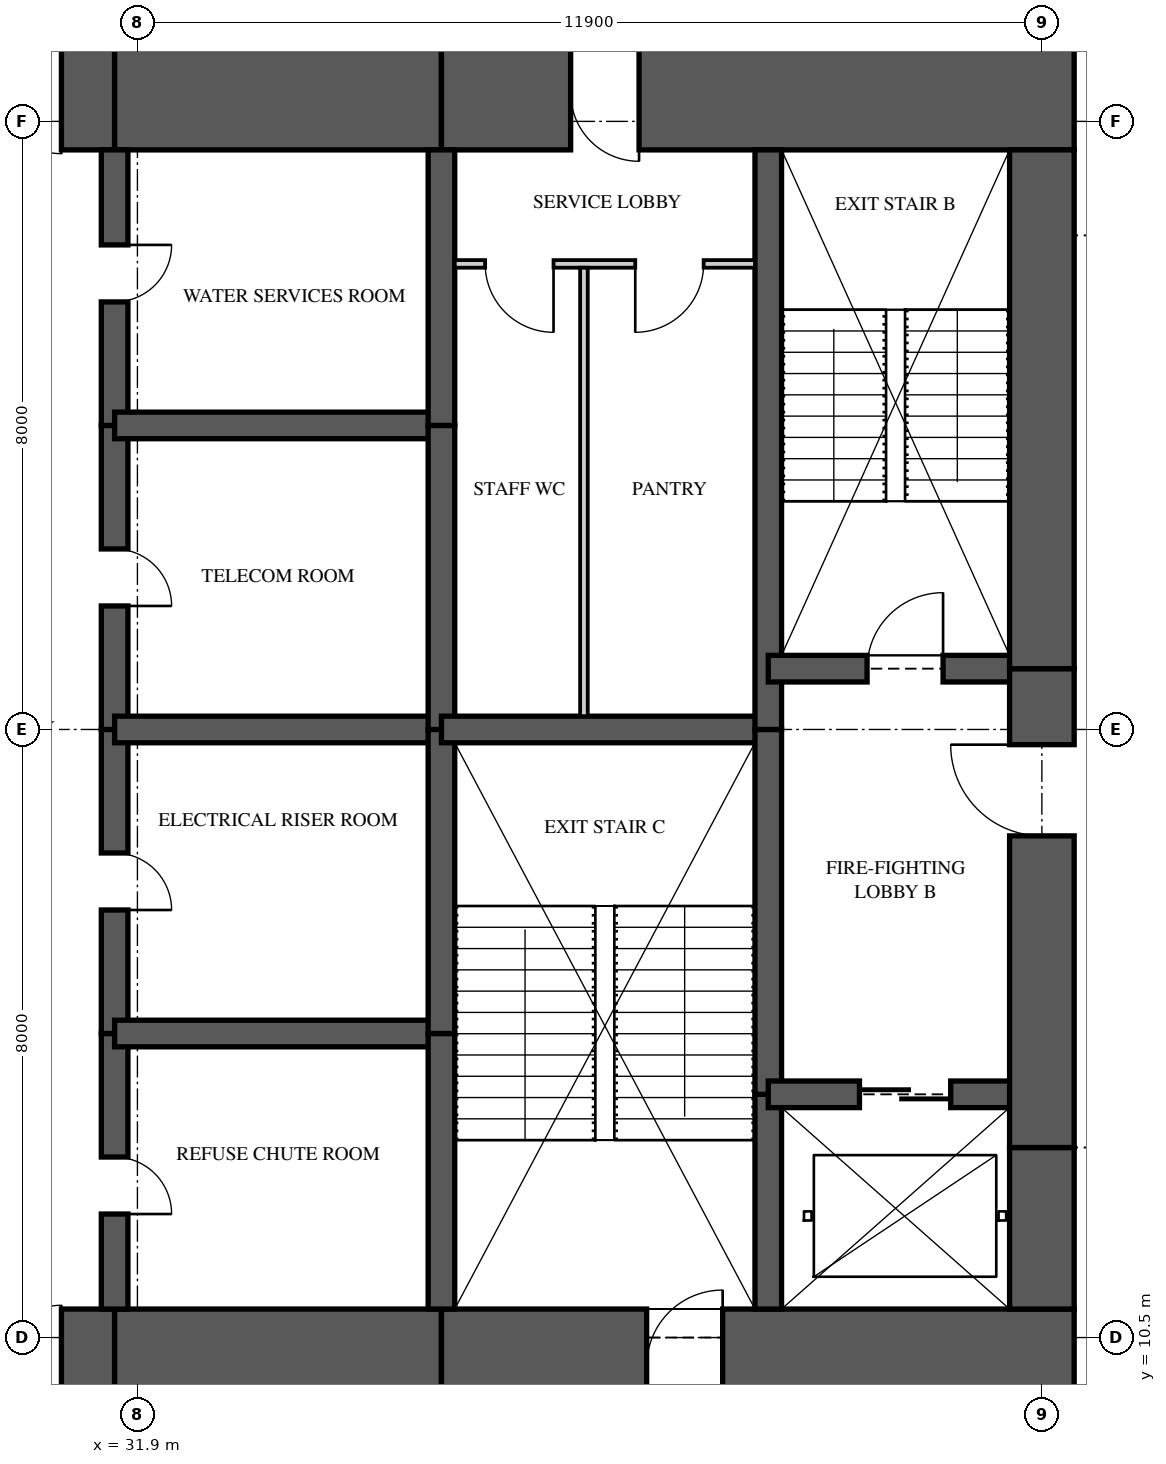
"""IFC4 building model, lengths in metres.
Left out: names, types, materials, properties, quantities, classifications, styles, units other than length and angle.
Written with IfcOpenShell. Run it as: python <this file> out.ifc"""

import sys

from ifc_helpers import new_model, si_unit, direction, frame, frame_2d, origin, place, context, subcontext, project, spatial, rectangle, extrude, element, fill, save


model = new_model("IFC4")
c1 = context("Model", 3, precision=1e-05, world=origin(), true_north=direction((0.0, 1.0)))
c2 = subcontext(c1, "Body", "Model", "MODEL_VIEW")
j1 = project(units=[si_unit("LENGTHUNIT", "METRE"), si_unit("PLANEANGLEUNIT", "RADIAN")], contexts=[c1])
p1 = place(None, origin())
s1 = spatial("IfcSite", under=j1, at=p1, CompositionType="ELEMENT")
p2 = place(p1, origin())
s2 = spatial("IfcBuilding", under=s1, at=p2, CompositionType="ELEMENT")
p3 = place(p2, frame((0.0, 0.0, 108.2)))
s3 = spatial("IfcBuildingStorey", under=s2, at=p3, CompositionType="ELEMENT", Elevation=108.2)
p4 = place(p3, frame((26.0, 10.125, 0.0), z_axis=(0.0, 0.0, 1.0), x_axis=(1.0, 0.0, 0.0)))
e1 = element("IfcWall", 1, at=p4, inside=s3, PredefinedType="SHEAR", context=c2, shape_type="SweptSolid", body=[
    extrude(rectangle(XDim=5.6, YDim=1.5, at=frame_2d((2.8, 0.0))), origin(), (0.0, 0.0, 1.0), 3.35),
])
p5 = place(p4, frame((3.3, 0.0, 0.0)))
e2 = element("IfcOpeningElement", 2, at=p5, cuts=e1, PredefinedType="OPENING", context=c2, shape_type="SweptSolid", body=[
    extrude(rectangle(XDim=1.6, YDim=2.1, at=frame_2d((0.8, 1.05))), frame((0.0, 0.76, 0.0), z_axis=(0.0, -1.0, 0.0), x_axis=(1.0, 0.0, 0.0)), (0.0, 0.0, 1.0), 1.52),
])
p6 = place(p3, frame((31.6, 10.125, 0.0), z_axis=(0.0, 0.0, 1.0), x_axis=(1.0, 0.0, 0.0)))
e3 = element("IfcWall", 3, at=p6, inside=s3, PredefinedType="SHEAR", context=c2, shape_type="SweptSolid", body=[
    extrude(rectangle(XDim=4.3, YDim=1.5, at=frame_2d((2.15, 0.0))), origin(), (0.0, 0.0, 1.0), 3.35),
])
p7 = place(p3, frame((35.9, 10.125, 0.0), z_axis=(0.0, 0.0, 1.0), x_axis=(1.0, 0.0, 0.0)))
e4 = element("IfcWall", 4, at=p7, inside=s3, PredefinedType="SHEAR", context=c2, shape_type="SweptSolid", body=[
    extrude(rectangle(XDim=8.325, YDim=1.5, at=frame_2d((4.163, 0.0))), origin(), (0.0, 0.0, 1.0), 3.35),
])
p8 = place(p7, frame((2.7, 0.0, 0.0)))
e5 = element("IfcOpeningElement", 5, at=p8, cuts=e4, PredefinedType="OPENING", context=c2, shape_type="SweptSolid", body=[
    extrude(rectangle(XDim=1.0, YDim=2.1, at=frame_2d((0.5, 1.05))), frame((0.0, 0.76, 0.0), z_axis=(0.0, -1.0, 0.0), x_axis=(1.0, 0.0, 0.0)), (0.0, 0.0, 1.0), 1.52),
])
p9 = place(p3, frame((44.225, 26.875, 0.0), z_axis=(0.0, 0.0, 1.0), x_axis=(-1.0, 0.0, 0.0)))
e6 = element("IfcWall", 6, at=p9, inside=s3, PredefinedType="SHEAR", context=c2, shape_type="SweptSolid", body=[
    extrude(rectangle(XDim=8.325, YDim=1.5, at=frame_2d((4.163, 0.0))), origin(), (0.0, 0.0, 1.0), 3.35),
])
p10 = place(p9, frame((5.725, 0.0, 0.0)))
e7 = element("IfcOpeningElement", 7, at=p10, cuts=e6, PredefinedType="OPENING", context=c2, shape_type="SweptSolid", body=[
    extrude(rectangle(XDim=0.9, YDim=2.1, at=frame_2d((0.45, 1.05))), frame((0.0, 0.76, 0.0), z_axis=(0.0, -1.0, 0.0), x_axis=(1.0, 0.0, 0.0)), (0.0, 0.0, 1.0), 1.52),
])
p11 = place(p3, frame((35.9, 26.875, 0.0), z_axis=(0.0, 0.0, 1.0), x_axis=(-1.0, 0.0, 0.0)))
e8 = element("IfcWall", 8, at=p11, inside=s3, PredefinedType="SHEAR", context=c2, shape_type="SweptSolid", body=[
    extrude(rectangle(XDim=4.3, YDim=1.5, at=frame_2d((2.15, 0.0))), origin(), (0.0, 0.0, 1.0), 3.35),
])
p12 = place(p3, frame((31.6, 26.875, 0.0), z_axis=(0.0, 0.0, 1.0), x_axis=(-1.0, 0.0, 0.0)))
e9 = element("IfcWall", 9, at=p12, inside=s3, PredefinedType="SHEAR", context=c2, shape_type="SweptSolid", body=[
    extrude(rectangle(XDim=5.6, YDim=1.5, at=frame_2d((2.8, 0.0))), origin(), (0.0, 0.0, 1.0), 3.35),
])
p13 = place(p12, frame((0.7, 0.0, 0.0)))
e10 = element("IfcOpeningElement", 10, at=p13, cuts=e9, PredefinedType="OPENING", context=c2, shape_type="SweptSolid", body=[
    extrude(rectangle(XDim=1.6, YDim=2.1, at=frame_2d((0.8, 1.05))), frame((0.0, 0.76, 0.0), z_axis=(0.0, -1.0, 0.0), x_axis=(1.0, 0.0, 0.0)), (0.0, 0.0, 1.0), 1.52),
])
p14 = place(p3, frame((43.8, 10.875, 0.0), z_axis=(0.0, 0.0, 1.0), x_axis=(0.0, 1.0, 0.0)))
e11 = element("IfcWall", 11, at=p14, inside=s3, PredefinedType="SHEAR", context=c2, shape_type="SweptSolid", body=[
    extrude(rectangle(XDim=2.125, YDim=0.85, at=frame_2d((1.062, 0.0))), origin(), (0.0, 0.0, 1.0), 3.35),
])
p15 = place(p3, frame((43.8, 13.0, 0.0), z_axis=(0.0, 0.0, 1.0), x_axis=(0.0, 1.0, 0.0)))
e12 = element("IfcWall", 12, at=p15, inside=s3, PredefinedType="SHEAR", context=c2, shape_type="SweptSolid", body=[
    extrude(rectangle(XDim=6.3, YDim=0.85, at=frame_2d((3.15, 0.0))), origin(), (0.0, 0.0, 1.0), 3.35),
])
p16 = place(p15, frame((4.1, 0.0, 0.0)))
e13 = element("IfcOpeningElement", 13, at=p16, cuts=e12, PredefinedType="OPENING", context=c2, shape_type="SweptSolid", body=[
    extrude(rectangle(XDim=1.2, YDim=2.2, at=frame_2d((0.6, 1.1))), frame((0.0, 0.435, 0.0), z_axis=(0.0, -1.0, 0.0), x_axis=(1.0, 0.0, 0.0)), (0.0, 0.0, 1.0), 0.87),
])
p17 = place(p3, frame((43.8, 19.3, 0.0), z_axis=(0.0, 0.0, 1.0), x_axis=(0.0, 1.0, 0.0)))
e14 = element("IfcWall", 14, at=p17, inside=s3, PredefinedType="SHEAR", context=c2, shape_type="SweptSolid", body=[
    extrude(rectangle(XDim=6.825, YDim=0.85, at=frame_2d((3.413, 0.0))), origin(), (0.0, 0.0, 1.0), 3.35),
])
p18 = place(p3, frame((31.6, 10.875, 0.0), z_axis=(0.0, 0.0, 1.0), x_axis=(0.0, 1.0, 0.0)))
e15 = element("IfcWall", 15, at=p18, inside=s3, PredefinedType="SHEAR", context=c2, shape_type="SweptSolid", body=[
    extrude(rectangle(XDim=3.625, YDim=0.35, at=frame_2d((1.812, 0.0))), origin(), (0.0, 0.0, 1.0), 3.35),
])
p19 = place(p18, frame((1.25, 0.0, 0.0)))
e16 = element("IfcOpeningElement", 16, at=p19, cuts=e15, PredefinedType="OPENING", context=c2, shape_type="SweptSolid", body=[
    extrude(rectangle(XDim=0.75, YDim=2.1, at=frame_2d((0.375, 1.05))), frame((0.0, 0.185, 0.0), z_axis=(0.0, -1.0, 0.0), x_axis=(1.0, 0.0, 0.0)), (0.0, 0.0, 1.0), 0.37),
])
p20 = place(p3, frame((31.6, 14.5, 0.0), z_axis=(0.0, 0.0, 1.0), x_axis=(0.0, 1.0, 0.0)))
e17 = element("IfcWall", 17, at=p20, inside=s3, PredefinedType="SHEAR", context=c2, shape_type="SweptSolid", body=[
    extrude(rectangle(XDim=4.0, YDim=0.35, at=frame_2d((2.0, 0.0))), origin(), (0.0, 0.0, 1.0), 3.35),
])
p21 = place(p20, frame((1.625, 0.0, 0.0)))
e18 = element("IfcOpeningElement", 18, at=p21, cuts=e17, PredefinedType="OPENING", context=c2, shape_type="SweptSolid", body=[
    extrude(rectangle(XDim=0.75, YDim=2.1, at=frame_2d((0.375, 1.05))), frame((0.0, 0.185, 0.0), z_axis=(0.0, -1.0, 0.0), x_axis=(1.0, 0.0, 0.0)), (0.0, 0.0, 1.0), 0.37),
])
p22 = place(p3, frame((31.6, 18.5, 0.0), z_axis=(0.0, 0.0, 1.0), x_axis=(0.0, 1.0, 0.0)))
e19 = element("IfcWall", 19, at=p22, inside=s3, PredefinedType="SHEAR", context=c2, shape_type="SweptSolid", body=[
    extrude(rectangle(XDim=4.0, YDim=0.35, at=frame_2d((2.0, 0.0))), origin(), (0.0, 0.0, 1.0), 3.35),
])
p23 = place(p22, frame((1.625, 0.0, 0.0)))
e20 = element("IfcOpeningElement", 20, at=p23, cuts=e19, PredefinedType="OPENING", context=c2, shape_type="SweptSolid", body=[
    extrude(rectangle(XDim=0.75, YDim=2.1, at=frame_2d((0.375, 1.05))), frame((0.0, 0.185, 0.0), z_axis=(0.0, -1.0, 0.0), x_axis=(1.0, 0.0, 0.0)), (0.0, 0.0, 1.0), 0.37),
])
p24 = place(p3, frame((31.6, 22.5, 0.0), z_axis=(0.0, 0.0, 1.0), x_axis=(0.0, 1.0, 0.0)))
e21 = element("IfcWall", 21, at=p24, inside=s3, PredefinedType="SHEAR", context=c2, shape_type="SweptSolid", body=[
    extrude(rectangle(XDim=3.625, YDim=0.35, at=frame_2d((1.812, 0.0))), origin(), (0.0, 0.0, 1.0), 3.35),
])
p25 = place(p24, frame((1.625, 0.0, 0.0)))
e22 = element("IfcOpeningElement", 22, at=p25, cuts=e21, PredefinedType="OPENING", context=c2, shape_type="SweptSolid", body=[
    extrude(rectangle(XDim=0.75, YDim=2.1, at=frame_2d((0.375, 1.05))), frame((0.0, 0.185, 0.0), z_axis=(0.0, -1.0, 0.0), x_axis=(1.0, 0.0, 0.0)), (0.0, 0.0, 1.0), 0.37),
])
p26 = place(p3, frame((35.9, 10.875, 0.0), z_axis=(0.0, 0.0, 1.0), x_axis=(0.0, 1.0, 0.0)))
e23 = element("IfcWall", 23, at=p26, inside=s3, PredefinedType="SHEAR", context=c2, shape_type="SweptSolid", body=[
    extrude(rectangle(XDim=3.625, YDim=0.35, at=frame_2d((1.812, 0.0))), origin(), (0.0, 0.0, 1.0), 3.35),
])
for number, where, z_axis, x_axis in (
    (24, (35.9, 14.5, 0.0), (0.0, 0.0, 1.0), (0.0, 1.0, 0.0)),
    (25, (35.9, 18.5, 0.0), (0.0, 0.0, 1.0), (0.0, 1.0, 0.0)),
):
    element("IfcWall", number, at=place(p3, frame(where, z_axis=z_axis, x_axis=x_axis)), inside=s3, PredefinedType="SHEAR", context=c2, shape_type="SweptSolid", body=[
        extrude(rectangle(XDim=4.0, YDim=0.35, at=frame_2d((2.0, 0.0))), origin(), (0.0, 0.0, 1.0), 3.35),
    ])
p27 = place(p3, frame((35.9, 22.5, 0.0), z_axis=(0.0, 0.0, 1.0), x_axis=(0.0, 1.0, 0.0)))
e26 = element("IfcWall", 26, at=p27, inside=s3, PredefinedType="SHEAR", context=c2, shape_type="SweptSolid", body=[
    extrude(rectangle(XDim=3.625, YDim=0.35, at=frame_2d((1.812, 0.0))), origin(), (0.0, 0.0, 1.0), 3.35),
])
p28 = place(p3, frame((40.2, 10.875, 0.0), z_axis=(0.0, 0.0, 1.0), x_axis=(0.0, 1.0, 0.0)))
e27 = element("IfcWall", 27, at=p28, inside=s3, PredefinedType="SHEAR", context=c2, shape_type="SweptSolid", body=[
    extrude(rectangle(XDim=2.825, YDim=0.35, at=frame_2d((1.413, 0.0))), origin(), (0.0, 0.0, 1.0), 3.35),
])
p29 = place(p3, frame((40.2, 13.7, 0.0), z_axis=(0.0, 0.0, 1.0), x_axis=(0.0, 1.0, 0.0)))
e28 = element("IfcWall", 28, at=p29, inside=s3, PredefinedType="SHEAR", context=c2, shape_type="SweptSolid", body=[
    extrude(rectangle(XDim=4.8, YDim=0.35, at=frame_2d((2.4, 0.0))), origin(), (0.0, 0.0, 1.0), 3.35),
])
p30 = place(p3, frame((40.2, 18.5, 0.0), z_axis=(0.0, 0.0, 1.0), x_axis=(0.0, 1.0, 0.0)))
e29 = element("IfcWall", 29, at=p30, inside=s3, PredefinedType="SHEAR", context=c2, shape_type="SweptSolid", body=[
    extrude(rectangle(XDim=7.625, YDim=0.35, at=frame_2d((3.812, 0.0))), origin(), (0.0, 0.0, 1.0), 3.35),
])
for number, where, z_axis, x_axis in (
    (30, (31.6, 14.5, 0.0), (0.0, 0.0, 1.0), (1.0, 0.0, 0.0)),
    (31, (31.6, 18.5, 0.0), (0.0, 0.0, 1.0), (1.0, 0.0, 0.0)),
    (32, (31.6, 22.5, 0.0), (0.0, 0.0, 1.0), (1.0, 0.0, 0.0)),
):
    element("IfcWall", number, at=place(p3, frame(where, z_axis=z_axis, x_axis=x_axis)), inside=s3, PredefinedType="SHEAR", context=c2, shape_type="SweptSolid", body=[
        extrude(rectangle(XDim=4.3, YDim=0.35, at=frame_2d((2.15, 0.0))), origin(), (0.0, 0.0, 1.0), 3.35),
    ])
p31 = place(p3, frame((35.9, 18.5, 0.0), z_axis=(0.0, 0.0, 1.0), x_axis=(1.0, 0.0, 0.0)))
e33 = element("IfcWall", 33, at=p31, inside=s3, PredefinedType="SHEAR", context=c2, shape_type="SweptSolid", body=[
    extrude(rectangle(XDim=4.3, YDim=0.35, at=frame_2d((2.15, 0.0))), origin(), (0.0, 0.0, 1.0), 3.35),
])
p32 = place(p3, frame((40.2, 13.7, 0.0), z_axis=(0.0, 0.0, 1.0), x_axis=(1.0, 0.0, 0.0)))
e34 = element("IfcWall", 34, at=p32, inside=s3, PredefinedType="SHEAR", context=c2, shape_type="SweptSolid", body=[
    extrude(rectangle(XDim=3.6, YDim=0.35, at=frame_2d((1.8, 0.0))), origin(), (0.0, 0.0, 1.0), 3.35),
])
p33 = place(p32, frame((1.2, 0.0, 0.0)))
e35 = element("IfcOpeningElement", 35, at=p33, cuts=e34, PredefinedType="OPENING", context=c2, shape_type="SweptSolid", body=[
    extrude(rectangle(XDim=1.2, YDim=2.1, at=frame_2d((0.6, 1.05))), frame((0.0, 0.185, 0.0), z_axis=(0.0, -1.0, 0.0), x_axis=(1.0, 0.0, 0.0)), (0.0, 0.0, 1.0), 0.37),
])
p34 = place(p3, frame((40.2, 19.3, 0.0), z_axis=(0.0, 0.0, 1.0), x_axis=(1.0, 0.0, 0.0)))
e36 = element("IfcWall", 36, at=p34, inside=s3, PredefinedType="SHEAR", context=c2, shape_type="SweptSolid", body=[
    extrude(rectangle(XDim=3.6, YDim=0.35, at=frame_2d((1.8, 0.0))), origin(), (0.0, 0.0, 1.0), 3.35),
])
p35 = place(p34, frame((1.3, 0.0, 0.0)))
e37 = element("IfcOpeningElement", 37, at=p35, cuts=e36, PredefinedType="OPENING", context=c2, shape_type="SweptSolid", body=[
    extrude(rectangle(XDim=1.0, YDim=2.1, at=frame_2d((0.5, 1.05))), frame((0.0, 0.185, 0.0), z_axis=(0.0, -1.0, 0.0), x_axis=(1.0, 0.0, 0.0)), (0.0, 0.0, 1.0), 0.37),
])
p36 = place(p3, frame((36.075, 24.625, 0.0), z_axis=(0.0, 0.0, 1.0), x_axis=(1.0, 0.0, 0.0)))
e38 = element("IfcWall", 38, at=p36, inside=s3, PredefinedType="PARTITIONING", context=c2, shape_type="SweptSolid", body=[
    extrude(rectangle(XDim=3.95, YDim=0.1, at=frame_2d((1.975, 0.0))), origin(), (0.0, 0.0, 1.0), 3.11),
])
p37 = place(p36, frame((0.4, 0.0, 0.0)))
e39 = element("IfcOpeningElement", 39, at=p37, cuts=e38, PredefinedType="OPENING", context=c2, shape_type="SweptSolid", body=[
    extrude(rectangle(XDim=0.9, YDim=2.1, at=frame_2d((0.45, 1.05))), frame((0.0, 0.06, 0.0), z_axis=(0.0, -1.0, 0.0), x_axis=(1.0, 0.0, 0.0)), (0.0, 0.0, 1.0), 0.12),
])
p38 = place(p36, frame((2.375, 0.0, 0.0)))
e40 = element("IfcOpeningElement", 40, at=p38, cuts=e38, PredefinedType="OPENING", context=c2, shape_type="SweptSolid", body=[
    extrude(rectangle(XDim=0.9, YDim=2.1, at=frame_2d((0.45, 1.05))), frame((0.0, 0.06, 0.0), z_axis=(0.0, -1.0, 0.0), x_axis=(1.0, 0.0, 0.0)), (0.0, 0.0, 1.0), 0.12),
])
p39 = place(p3, frame((37.775, 18.675, 0.0), z_axis=(0.0, 0.0, 1.0), x_axis=(0.0, 1.0, 0.0)))
e41 = element("IfcWall", 41, at=p39, inside=s3, PredefinedType="PARTITIONING", context=c2, shape_type="SweptSolid", body=[
    extrude(rectangle(XDim=5.9, YDim=0.1, at=frame_2d((2.95, 0.0))), origin(), (0.0, 0.0, 1.0), 3.11),
])
p40 = place(p37, frame((0.9, 0.0, 0.0), z_axis=(0.0, 0.0, 1.0), x_axis=(-1.0, 0.0, 0.0)))
e42 = element("IfcDoor", 42, at=p40, inside=s3, OperationType="SINGLE_SWING_LEFT", PredefinedType="DOOR", context=c2, shape_type="SweptSolid", body=[
    extrude(rectangle(XDim=0.9, YDim=2.1, at=frame_2d((0.45, 1.05))), frame((0.0, 0.025, 0.0), z_axis=(0.0, -1.0, 0.0), x_axis=(1.0, 0.0, 0.0)), (0.0, 0.0, 1.0), 0.05),
])
fill(e39, e42)
p41 = place(p38, frame((0.9, 0.0, 0.0), z_axis=(0.0, 0.0, 1.0), x_axis=(-1.0, 0.0, 0.0)))
e43 = element("IfcDoor", 43, at=p41, inside=s3, OperationType="SINGLE_SWING_RIGHT", PredefinedType="DOOR", context=c2, shape_type="SweptSolid", body=[
    extrude(rectangle(XDim=0.9, YDim=2.1, at=frame_2d((0.45, 1.05))), frame((0.0, 0.025, 0.0), z_axis=(0.0, -1.0, 0.0), x_axis=(1.0, 0.0, 0.0)), (0.0, 0.0, 1.0), 0.05),
])
fill(e40, e43)
p42 = place(p35, origin())
e44 = element("IfcDoor", 44, at=p42, inside=s3, OperationType="SINGLE_SWING_RIGHT", PredefinedType="DOOR", context=c2, shape_type="SweptSolid", body=[
    extrude(rectangle(XDim=1.0, YDim=2.1, at=frame_2d((0.5, 1.05))), frame((0.0, 0.025, 0.0), z_axis=(0.0, -1.0, 0.0), x_axis=(1.0, 0.0, 0.0)), (0.0, 0.0, 1.0), 0.05),
])
fill(e37, e44)
p43 = place(p16, origin())
e45 = element("IfcDoor", 45, at=p43, inside=s3, OperationType="SINGLE_SWING_RIGHT", PredefinedType="DOOR", context=c2, shape_type="SweptSolid", body=[
    extrude(rectangle(XDim=1.2, YDim=2.2, at=frame_2d((0.6, 1.1))), frame((0.0, 0.025, 0.0), z_axis=(0.0, -1.0, 0.0), x_axis=(1.0, 0.0, 0.0)), (0.0, 0.0, 1.0), 0.05),
])
fill(e13, e45)
p44 = place(p33, origin())
e46 = element("IfcDoor", 46, at=p44, inside=s3, OperationType="SLIDING_TO_LEFT", PredefinedType="DOOR", context=c2, shape_type="SweptSolid", body=[
    extrude(rectangle(XDim=1.2, YDim=2.1, at=frame_2d((0.6, 1.05))), frame((0.0, 0.025, 0.0), z_axis=(0.0, -1.0, 0.0), x_axis=(1.0, 0.0, 0.0)), (0.0, 0.0, 1.0), 0.05),
])
fill(e35, e46)
p45 = place(p5, origin())
e47 = element("IfcDoor", 47, at=p45, inside=s3, OperationType="DOUBLE_DOOR_SINGLE_SWING", PredefinedType="DOOR", context=c2, shape_type="SweptSolid", body=[
    extrude(rectangle(XDim=1.6, YDim=2.1, at=frame_2d((0.8, 1.05))), frame((0.0, 0.025, 0.0), z_axis=(0.0, -1.0, 0.0), x_axis=(1.0, 0.0, 0.0)), (0.0, 0.0, 1.0), 0.05),
])
fill(e2, e47)
p46 = place(p13, origin())
e48 = element("IfcDoor", 48, at=p46, inside=s3, OperationType="DOUBLE_DOOR_SINGLE_SWING", PredefinedType="DOOR", context=c2, shape_type="SweptSolid", body=[
    extrude(rectangle(XDim=1.6, YDim=2.1, at=frame_2d((0.8, 1.05))), frame((0.0, 0.025, 0.0), z_axis=(0.0, -1.0, 0.0), x_axis=(1.0, 0.0, 0.0)), (0.0, 0.0, 1.0), 0.05),
])
fill(e10, e48)
p47 = place(p19, frame((0.75, 0.0, 0.0), z_axis=(0.0, 0.0, 1.0), x_axis=(-1.0, 0.0, 0.0)))
e49 = element("IfcDoor", 49, at=p47, inside=s3, OperationType="SINGLE_SWING_RIGHT", PredefinedType="DOOR", context=c2, shape_type="SweptSolid", body=[
    extrude(rectangle(XDim=0.75, YDim=2.1, at=frame_2d((0.375, 1.05))), frame((0.0, 0.025, 0.0), z_axis=(0.0, -1.0, 0.0), x_axis=(1.0, 0.0, 0.0)), (0.0, 0.0, 1.0), 0.05),
])
fill(e16, e49)
p48 = place(p21, frame((0.75, 0.0, 0.0), z_axis=(0.0, 0.0, 1.0), x_axis=(-1.0, 0.0, 0.0)))
e50 = element("IfcDoor", 50, at=p48, inside=s3, OperationType="SINGLE_SWING_RIGHT", PredefinedType="DOOR", context=c2, shape_type="SweptSolid", body=[
    extrude(rectangle(XDim=0.75, YDim=2.1, at=frame_2d((0.375, 1.05))), frame((0.0, 0.025, 0.0), z_axis=(0.0, -1.0, 0.0), x_axis=(1.0, 0.0, 0.0)), (0.0, 0.0, 1.0), 0.05),
])
fill(e18, e50)
p49 = place(p23, frame((0.75, 0.0, 0.0), z_axis=(0.0, 0.0, 1.0), x_axis=(-1.0, 0.0, 0.0)))
e51 = element("IfcDoor", 51, at=p49, inside=s3, OperationType="SINGLE_SWING_RIGHT", PredefinedType="DOOR", context=c2, shape_type="SweptSolid", body=[
    extrude(rectangle(XDim=0.75, YDim=2.1, at=frame_2d((0.375, 1.05))), frame((0.0, 0.025, 0.0), z_axis=(0.0, -1.0, 0.0), x_axis=(1.0, 0.0, 0.0)), (0.0, 0.0, 1.0), 0.05),
])
fill(e20, e51)
p50 = place(p25, frame((0.75, 0.0, 0.0), z_axis=(0.0, 0.0, 1.0), x_axis=(-1.0, 0.0, 0.0)))
e52 = element("IfcDoor", 52, at=p50, inside=s3, OperationType="SINGLE_SWING_LEFT", PredefinedType="DOOR", context=c2, shape_type="SweptSolid", body=[
    extrude(rectangle(XDim=0.75, YDim=2.1, at=frame_2d((0.375, 1.05))), frame((0.0, 0.025, 0.0), z_axis=(0.0, -1.0, 0.0), x_axis=(1.0, 0.0, 0.0)), (0.0, 0.0, 1.0), 0.05),
])
fill(e22, e52)
p51 = place(p8, origin())
e53 = element("IfcDoor", 53, at=p51, inside=s3, OperationType="SINGLE_SWING_RIGHT", PredefinedType="DOOR", context=c2, shape_type="SweptSolid", body=[
    extrude(rectangle(XDim=1.0, YDim=2.1, at=frame_2d((0.5, 1.05))), frame((0.0, 0.025, 0.0), z_axis=(0.0, -1.0, 0.0), x_axis=(1.0, 0.0, 0.0)), (0.0, 0.0, 1.0), 0.05),
])
fill(e5, e53)
p52 = place(p10, origin())
e54 = element("IfcDoor", 54, at=p52, inside=s3, OperationType="SINGLE_SWING_LEFT", PredefinedType="DOOR", context=c2, shape_type="SweptSolid", body=[
    extrude(rectangle(XDim=0.9, YDim=2.1, at=frame_2d((0.45, 1.05))), frame((0.0, 0.47, 0.0), z_axis=(0.0, -1.0, 0.0), x_axis=(1.0, 0.0, 0.0)), (0.0, 0.0, 1.0), 0.8),
])
fill(e7, e54)
save(model, sys.argv[1])
